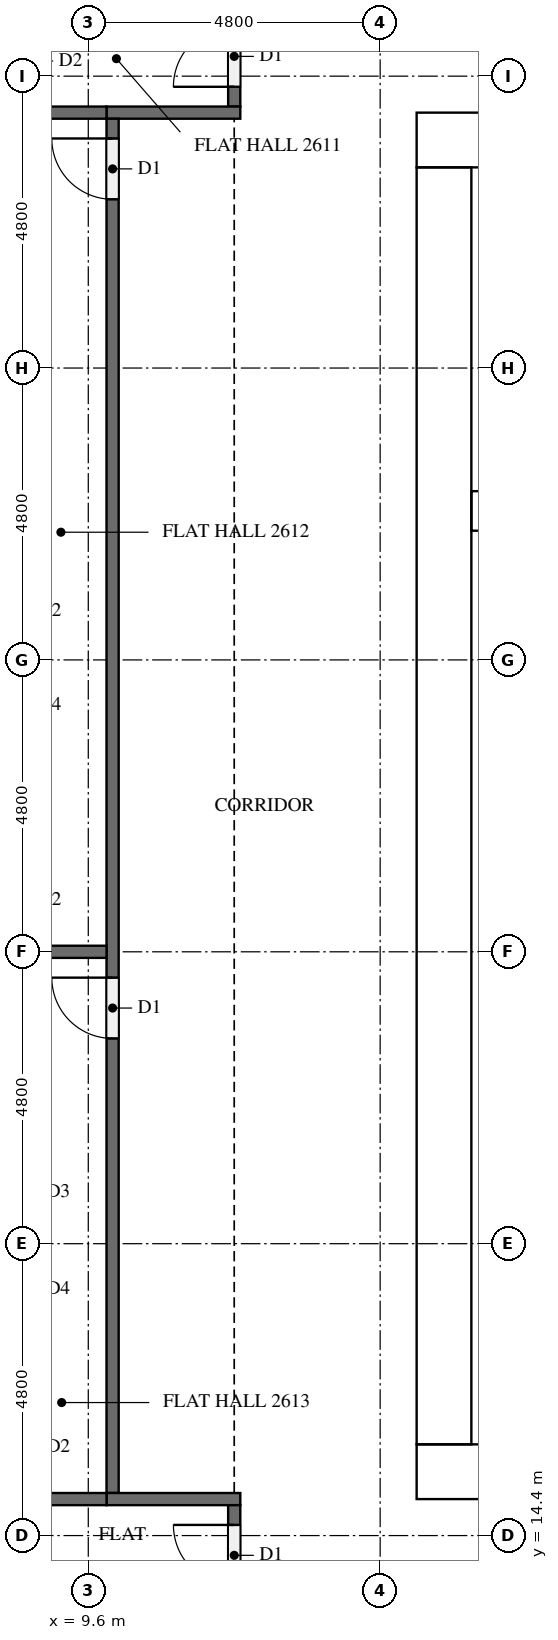
"""IFC4 building model, lengths in metres.
Left out: names, types, materials, properties, quantities, classifications, styles, units other than length and angle.
Written with IfcOpenShell. Run it as: python <this file> out.ifc"""

import sys

from ifc_helpers import new_model, si_unit, direction, frame, frame_2d, origin, place, context, subcontext, project, spatial, rectangle, extrude, element, fill, save


model = new_model("IFC4")
c1 = context("Model", 3, precision=1e-05, world=origin(), true_north=direction((0.0, 1.0)))
c2 = subcontext(c1, "Body", "Model", "MODEL_VIEW")
j1 = project(units=[si_unit("LENGTHUNIT", "METRE"), si_unit("PLANEANGLEUNIT", "RADIAN")], contexts=[c1])
p1 = place(None, origin())
s1 = spatial("IfcSite", under=j1, at=p1, CompositionType="ELEMENT")
p2 = place(p1, origin())
s2 = spatial("IfcBuilding", under=s1, at=p2, CompositionType="ELEMENT")
p3 = place(p2, frame((0.0, 0.0, 103.2)))
s3 = spatial("IfcBuildingStorey", under=s2, at=p3, CompositionType="ELEMENT", Elevation=103.2)
p4 = place(p3, frame((15.0, 15.45, 0.0), z_axis=(0.0, 0.0, 1.0), x_axis=(1.0, 0.0, 0.0)))
e1 = element("IfcWall", 1, at=p4, inside=s3, PredefinedType="SHEAR", context=c2, shape_type="SweptSolid", body=[
    extrude(rectangle(XDim=32.4, YDim=0.9, at=frame_2d((16.2, 0.0))), origin(), (0.0, 0.0, 1.0), 3.2),
])
p5 = place(p4, frame((15.3, 0.0, 0.0)))
e2 = element("IfcOpeningElement", 2, at=p5, cuts=e1, PredefinedType="OPENING", context=c2, shape_type="SweptSolid", body=[
    extrude(rectangle(XDim=1.8, YDim=2.1, at=frame_2d((0.9, 1.05))), frame((0.0, 0.46, 0.0), z_axis=(0.0, -1.0, 0.0), x_axis=(1.0, 0.0, 0.0)), (0.0, 0.0, 1.0), 0.92),
])
p6 = place(p3, frame((15.0, 37.35, 0.0), z_axis=(0.0, 0.0, 1.0), x_axis=(1.0, 0.0, 0.0)))
e3 = element("IfcWall", 3, at=p6, inside=s3, PredefinedType="SHEAR", context=c2, shape_type="SweptSolid", body=[
    extrude(rectangle(XDim=32.4, YDim=0.9, at=frame_2d((16.2, 0.0))), origin(), (0.0, 0.0, 1.0), 3.2),
])
p7 = place(p6, frame((15.3, 0.0, 0.0)))
e4 = element("IfcOpeningElement", 4, at=p7, cuts=e3, PredefinedType="OPENING", context=c2, shape_type="SweptSolid", body=[
    extrude(rectangle(XDim=1.8, YDim=2.1, at=frame_2d((0.9, 1.05))), frame((0.0, 0.46, 0.0), z_axis=(0.0, -1.0, 0.0), x_axis=(1.0, 0.0, 0.0)), (0.0, 0.0, 1.0), 0.92),
])
p8 = place(p6, frame((1.794, 0.0, 0.0)))
e5 = element("IfcOpeningElement", 5, at=p8, cuts=e3, PredefinedType="OPENING", context=c2, shape_type="SweptSolid", body=[
    extrude(rectangle(XDim=1.0, YDim=2.1, at=frame_2d((0.5, 1.05))), frame((0.0, 0.46, 0.0), z_axis=(0.0, -1.0, 0.0), x_axis=(1.0, 0.0, 0.0)), (0.0, 0.0, 1.0), 0.92),
])
p9 = place(p6, frame((5.331, 0.0, 0.0)))
e6 = element("IfcOpeningElement", 6, at=p9, cuts=e3, PredefinedType="OPENING", context=c2, shape_type="SweptSolid", body=[
    extrude(rectangle(XDim=1.0, YDim=2.1, at=frame_2d((0.5, 1.05))), frame((0.0, 0.46, 0.0), z_axis=(0.0, -1.0, 0.0), x_axis=(1.0, 0.0, 0.0)), (0.0, 0.0, 1.0), 0.92),
])
p10 = place(p3, frame((15.45, 15.9, 0.0), z_axis=(0.0, 0.0, 1.0), x_axis=(0.0, 1.0, 0.0)))
e7 = element("IfcWall", 7, at=p10, inside=s3, PredefinedType="SHEAR", context=c2, shape_type="SweptSolid", body=[
    extrude(rectangle(XDim=21.0, YDim=0.9, at=frame_2d((10.5, 0.0))), origin(), (0.0, 0.0, 1.0), 3.2),
])
p11 = place(p10, frame((4.86, 0.0, 0.0)))
e8 = element("IfcOpeningElement", 8, at=p11, cuts=e7, PredefinedType="OPENING", context=c2, shape_type="SweptSolid", body=[
    extrude(rectangle(XDim=1.2, YDim=2.1, at=frame_2d((0.6, 1.05))), frame((0.0, 0.46, 0.0), z_axis=(0.0, -1.0, 0.0), x_axis=(1.0, 0.0, 0.0)), (0.0, 0.0, 1.0), 0.92),
])
p12 = place(p3, frame((15.9, 31.25, 0.0), z_axis=(0.0, 0.0, 1.0), x_axis=(1.0, 0.0, 0.0)))
e9 = element("IfcWall", 9, at=p12, inside=s3, PredefinedType="SHEAR", context=c2, shape_type="SweptSolid", body=[
    extrude(rectangle(XDim=6.875, YDim=0.65, at=frame_2d((3.438, 0.0))), origin(), (0.0, 0.0, 1.0), 3.2),
])
p13 = place(p3, frame((12.0, 37.9, 0.0), z_axis=(0.0, 0.0, 1.0), x_axis=(0.0, 1.0, 0.0)))
e10 = element("IfcWall", 10, at=p13, inside=s3, PredefinedType="PARTITIONING", context=c2, shape_type="SweptSolid", body=[
    extrude(rectangle(XDim=2.8, YDim=0.2, at=frame_2d((1.4, 0.0))), origin(), (0.0, 0.0, 1.0), 3.2),
])
p14 = place(p13, frame((0.325, 0.0, 0.0)))
e11 = element("IfcOpeningElement", 11, at=p14, cuts=e10, PredefinedType="OPENING", context=c2, shape_type="SweptSolid", body=[
    extrude(rectangle(XDim=1.0, YDim=2.1, at=frame_2d((0.5, 1.05))), frame((0.0, 0.11, 0.0), z_axis=(0.0, -1.0, 0.0), x_axis=(1.0, 0.0, 0.0)), (0.0, 0.0, 1.0), 0.22),
])
p15 = place(p3, frame((12.1, 37.8, 0.0), z_axis=(0.0, 0.0, 1.0), x_axis=(-1.0, 0.0, 0.0)))
e12 = element("IfcWall", 12, at=p15, inside=s3, PredefinedType="PARTITIONING", context=c2, shape_type="SweptSolid", body=[
    extrude(rectangle(XDim=2.2, YDim=0.2, at=frame_2d((1.1, 0.0))), origin(), (0.0, 0.0, 1.0), 3.2),
])
p16 = place(p3, frame((10.0, 15.1, 0.0), z_axis=(0.0, 0.0, 1.0), x_axis=(0.0, 1.0, 0.0)))
e13 = element("IfcWall", 13, at=p16, inside=s3, PredefinedType="PARTITIONING", context=c2, shape_type="SweptSolid", body=[
    extrude(rectangle(XDim=22.6, YDim=0.2, at=frame_2d((11.3, 0.0))), origin(), (0.0, 0.0, 1.0), 3.2),
])
p17 = place(p16, frame((21.275, 0.0, 0.0)))
e14 = element("IfcOpeningElement", 14, at=p17, cuts=e13, PredefinedType="OPENING", context=c2, shape_type="SweptSolid", body=[
    extrude(rectangle(XDim=1.0, YDim=2.1, at=frame_2d((0.5, 1.05))), frame((0.0, 0.11, 0.0), z_axis=(0.0, -1.0, 0.0), x_axis=(1.0, 0.0, 0.0)), (0.0, 0.0, 1.0), 0.22),
])
p18 = place(p16, frame((7.475, 0.0, 0.0)))
e15 = element("IfcOpeningElement", 15, at=p18, cuts=e13, PredefinedType="OPENING", context=c2, shape_type="SweptSolid", body=[
    extrude(rectangle(XDim=1.0, YDim=2.1, at=frame_2d((0.5, 1.05))), frame((0.0, 0.11, 0.0), z_axis=(0.0, -1.0, 0.0), x_axis=(1.0, 0.0, 0.0)), (0.0, 0.0, 1.0), 0.22),
])
p19 = place(p3, frame((9.9, 15.0, 0.0), z_axis=(0.0, 0.0, 1.0), x_axis=(1.0, 0.0, 0.0)))
e16 = element("IfcWall", 16, at=p19, inside=s3, PredefinedType="PARTITIONING", context=c2, shape_type="SweptSolid", body=[
    extrude(rectangle(XDim=2.2, YDim=0.2, at=frame_2d((1.1, 0.0))), origin(), (0.0, 0.0, 1.0), 3.2),
])
p20 = place(p3, frame((12.0, 12.1, 0.0), z_axis=(0.0, 0.0, 1.0), x_axis=(0.0, 1.0, 0.0)))
e17 = element("IfcWall", 17, at=p20, inside=s3, PredefinedType="PARTITIONING", context=c2, shape_type="SweptSolid", body=[
    extrude(rectangle(XDim=2.8, YDim=0.2, at=frame_2d((1.4, 0.0))), origin(), (0.0, 0.0, 1.0), 3.2),
])
p21 = place(p20, frame((1.475, 0.0, 0.0)))
e18 = element("IfcOpeningElement", 18, at=p21, cuts=e17, PredefinedType="OPENING", context=c2, shape_type="SweptSolid", body=[
    extrude(rectangle(XDim=1.0, YDim=2.1, at=frame_2d((0.5, 1.05))), frame((0.0, 0.11, 0.0), z_axis=(0.0, -1.0, 0.0), x_axis=(1.0, 0.0, 0.0)), (0.0, 0.0, 1.0), 0.22),
])
p22 = place(p3, frame((5.225, 37.8, 0.0), z_axis=(0.0, 0.0, 1.0), x_axis=(1.0, 0.0, 0.0)))
e19 = element("IfcWall", 19, at=p22, inside=s3, PredefinedType="PARTITIONING", context=c2, shape_type="SweptSolid", body=[
    extrude(rectangle(XDim=4.675, YDim=0.2, at=frame_2d((2.337, 0.0))), origin(), (0.0, 0.0, 1.0), 3.2),
])
for number, where, z_axis, x_axis in (
    (20, (4.9, 24.0, 0.0), (0.0, 0.0, 1.0), (1.0, 0.0, 0.0)),
    (21, (4.9, 15.0, 0.0), (0.0, 0.0, 1.0), (1.0, 0.0, 0.0)),
):
    element("IfcWall", number, at=place(p3, frame(where, z_axis=z_axis, x_axis=x_axis)), inside=s3, PredefinedType="PARTITIONING", context=c2, shape_type="SweptSolid", body=[
        extrude(rectangle(XDim=5.0, YDim=0.2, at=frame_2d((2.5, 0.0))), origin(), (0.0, 0.0, 1.0), 3.2),
    ])
p23 = place(p11, frame((1.2, 0.0, 0.0), z_axis=(0.0, 0.0, 1.0), x_axis=(-1.0, 0.0, 0.0)))
e22 = element("IfcDoor", 22, at=p23, inside=s3, OperationType="SINGLE_SWING_LEFT", PredefinedType="DOOR", context=c2, shape_type="SweptSolid", body=[
    extrude(rectangle(XDim=1.2, YDim=2.1, at=frame_2d((0.6, 1.05))), frame((0.0, 0.025, 0.0), z_axis=(0.0, -1.0, 0.0), x_axis=(1.0, 0.0, 0.0)), (0.0, 0.0, 1.0), 0.05),
])
fill(e8, e22)
p24 = place(p14, origin())
e23 = element("IfcDoor", 23, at=p24, inside=s3, OperationType="SINGLE_SWING_LEFT", PredefinedType="DOOR", context=c2, shape_type="SweptSolid", body=[
    extrude(rectangle(XDim=1.0, YDim=2.1, at=frame_2d((0.5, 1.05))), frame((0.0, 0.025, 0.0), z_axis=(0.0, -1.0, 0.0), x_axis=(1.0, 0.0, 0.0)), (0.0, 0.0, 1.0), 0.05),
])
fill(e11, e23)
p25 = place(p17, origin())
e24 = element("IfcDoor", 24, at=p25, inside=s3, OperationType="SINGLE_SWING_RIGHT", PredefinedType="DOOR", context=c2, shape_type="SweptSolid", body=[
    extrude(rectangle(XDim=1.0, YDim=2.1, at=frame_2d((0.5, 1.05))), frame((0.0, 0.025, 0.0), z_axis=(0.0, -1.0, 0.0), x_axis=(1.0, 0.0, 0.0)), (0.0, 0.0, 1.0), 0.05),
])
fill(e14, e24)
p26 = place(p18, origin())
e25 = element("IfcDoor", 25, at=p26, inside=s3, OperationType="SINGLE_SWING_RIGHT", PredefinedType="DOOR", context=c2, shape_type="SweptSolid", body=[
    extrude(rectangle(XDim=1.0, YDim=2.1, at=frame_2d((0.5, 1.05))), frame((0.0, 0.025, 0.0), z_axis=(0.0, -1.0, 0.0), x_axis=(1.0, 0.0, 0.0)), (0.0, 0.0, 1.0), 0.05),
])
fill(e15, e25)
p27 = place(p21, origin())
e26 = element("IfcDoor", 26, at=p27, inside=s3, OperationType="SINGLE_SWING_RIGHT", PredefinedType="DOOR", context=c2, shape_type="SweptSolid", body=[
    extrude(rectangle(XDim=1.0, YDim=2.1, at=frame_2d((0.5, 1.05))), frame((0.0, 0.025, 0.0), z_axis=(0.0, -1.0, 0.0), x_axis=(1.0, 0.0, 0.0)), (0.0, 0.0, 1.0), 0.05),
])
fill(e18, e26)
save(model, sys.argv[1])
